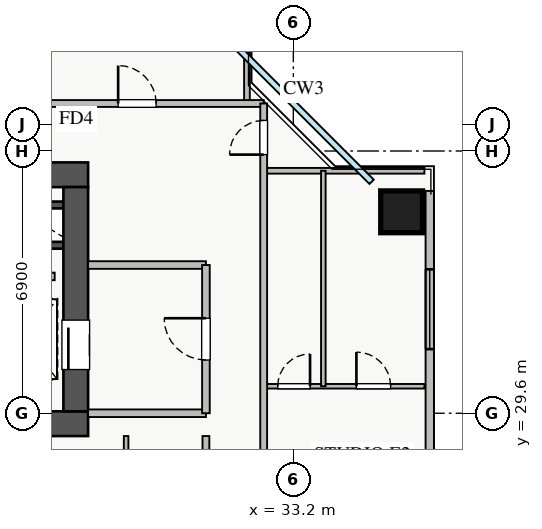
"""IFC4 building model, lengths in metres.
Left out: names, types, materials, properties, quantities, classifications, styles, units other than length and angle.
Written with IfcOpenShell. Run it as: python <this file> out.ifc"""

import sys

from ifc_helpers import new_model, si_unit, direction, frame, frame_2d, origin, origin_2d, place, context, subcontext, project, spatial, rectangle, extrude, source, transform, mapped, element, fill, save


model = new_model("IFC4")
c1 = context("Model", 3, precision=1e-05, world=origin(), true_north=direction((0.0, 1.0)))
c2 = subcontext(c1, "Body", "Model", "MODEL_VIEW")
j1 = project(units=[si_unit("LENGTHUNIT", "METRE"), si_unit("PLANEANGLEUNIT", "RADIAN")], contexts=[c1])
p1 = place(None, origin())
s1 = spatial("IfcSite", under=j1, at=p1, CompositionType="ELEMENT")
p2 = place(p1, origin())
s2 = spatial("IfcBuilding", under=s1, at=p2, CompositionType="ELEMENT")
p3 = place(p2, frame((0.0, 0.0, 113.25)))
s3 = spatial("IfcBuildingStorey", under=s2, at=p3, CompositionType="ELEMENT", Elevation=113.25)
for number, where, z_axis, x_axis in (
    (1, (25.8, 35.08, 0.0), (0.0, 0.0, 1.0), (1.0, 0.0, 0.0)),
    (2, (25.8, 34.02, 0.0), (0.0, 0.0, 1.0), (1.0, 0.0, 0.0)),
):
    element("IfcWall", number, at=place(p3, frame(where, z_axis=z_axis, x_axis=x_axis)), inside=s3, PredefinedType="SHEAR", context=c2, shape_type="SweptSolid", body=[
        extrude(rectangle(XDim=1.35, YDim=0.18, at=frame_2d((0.675, 0.0))), origin(), (0.0, 0.0, 1.0), 3.07),
    ])
p4 = place(p3, frame((10.2, 29.325, 0.0), z_axis=(0.0, 0.0, 1.0), x_axis=(1.0, 0.0, 0.0)))
e3 = element("IfcWall", 3, at=p4, inside=s3, PredefinedType="SHEAR", context=c2, shape_type="SweptSolid", body=[
    extrude(rectangle(XDim=17.6, YDim=0.65, at=frame_2d((8.8, 0.0))), origin(), (0.0, 0.0, 1.0), 3.25),
])
p5 = place(p3, frame((10.2, 35.875, 0.0), z_axis=(0.0, 0.0, 1.0), x_axis=(1.0, 0.0, 0.0)))
e4 = element("IfcWall", 4, at=p5, inside=s3, PredefinedType="SHEAR", context=c2, shape_type="SweptSolid", body=[
    extrude(rectangle(XDim=17.6, YDim=0.65, at=frame_2d((8.8, 0.0))), origin(), (0.0, 0.0, 1.0), 3.25),
])
p6 = place(p5, frame((1.15, 0.0, 0.0)))
e5 = element("IfcOpeningElement", 5, at=p6, cuts=e4, PredefinedType="OPENING", context=c2, shape_type="SweptSolid", body=[
    extrude(rectangle(XDim=1.1, YDim=2.05, at=frame_2d((0.55, 1.025))), frame((0.0, 0.335, 0.0), z_axis=(0.0, -1.0, 0.0), x_axis=(1.0, 0.0, 0.0)), (0.0, 0.0, 1.0), 0.67),
])
p7 = place(p5, frame((8.3, 0.0, 0.0)))
e6 = element("IfcOpeningElement", 6, at=p7, cuts=e4, PredefinedType="OPENING", context=c2, shape_type="SweptSolid", body=[
    extrude(rectangle(XDim=1.1, YDim=2.05, at=frame_2d((0.55, 1.025))), frame((0.0, 0.335, 0.0), z_axis=(0.0, -1.0, 0.0), x_axis=(1.0, 0.0, 0.0)), (0.0, 0.0, 1.0), 0.67),
])
p8 = place(p5, frame((4.9, 0.0, 0.0)))
e7 = element("IfcOpeningElement", 7, at=p8, cuts=e4, PredefinedType="OPENING", context=c2, shape_type="SweptSolid", body=[
    extrude(rectangle(XDim=1.1, YDim=2.05, at=frame_2d((0.55, 1.025))), frame((0.0, 0.335, 0.0), z_axis=(0.0, -1.0, 0.0), x_axis=(1.0, 0.0, 0.0)), (0.0, 0.0, 1.0), 0.67),
])
p9 = place(p5, frame((14.74, 0.0, 0.0)))
e8 = element("IfcOpeningElement", 8, at=p9, cuts=e4, PredefinedType="OPENING", context=c2, shape_type="SweptSolid", body=[
    extrude(rectangle(XDim=1.0, YDim=2.05, at=frame_2d((0.5, 1.025))), frame((0.0, 0.335, 0.0), z_axis=(0.0, -1.0, 0.0), x_axis=(1.0, 0.0, 0.0)), (0.0, 0.0, 1.0), 0.67),
])
p10 = place(p5, frame((10.005, 0.0, 0.0)))
e9 = element("IfcOpeningElement", 9, at=p10, cuts=e4, PredefinedType="OPENING", context=c2, shape_type="SweptSolid", body=[
    extrude(rectangle(XDim=1.0, YDim=2.05, at=frame_2d((0.5, 1.025))), frame((0.0, 0.335, 0.0), z_axis=(0.0, -1.0, 0.0), x_axis=(1.0, 0.0, 0.0)), (0.0, 0.0, 1.0), 0.67),
])
p11 = place(p5, frame((11.55, 0.0, 0.0)))
e10 = element("IfcOpeningElement", 10, at=p11, cuts=e4, PredefinedType="OPENING", context=c2, shape_type="SweptSolid", body=[
    extrude(rectangle(XDim=1.0, YDim=2.05, at=frame_2d((0.5, 1.025))), frame((0.0, 0.335, 0.0), z_axis=(0.0, -1.0, 0.0), x_axis=(1.0, 0.0, 0.0)), (0.0, 0.0, 1.0), 0.67),
])
p12 = place(p5, frame((13.215, 0.0, 0.0)))
e11 = element("IfcOpeningElement", 11, at=p12, cuts=e4, PredefinedType="OPENING", context=c2, shape_type="SweptSolid", body=[
    extrude(rectangle(XDim=1.0, YDim=2.05, at=frame_2d((0.5, 1.025))), frame((0.0, 0.335, 0.0), z_axis=(0.0, -1.0, 0.0), x_axis=(1.0, 0.0, 0.0)), (0.0, 0.0, 1.0), 0.67),
])
p13 = place(p3, frame((27.475, 29.65, 0.0), z_axis=(0.0, 0.0, 1.0), x_axis=(0.0, 1.0, 0.0)))
e12 = element("IfcWall", 12, at=p13, inside=s3, PredefinedType="SHEAR", context=c2, shape_type="SweptSolid", body=[
    extrude(rectangle(XDim=5.9, YDim=0.65, at=frame_2d((2.95, 0.0))), origin(), (0.0, 0.0, 1.0), 3.25),
])
p14 = place(p13, frame((1.1, 0.0, 0.0)))
e13 = element("IfcOpeningElement", 13, at=p14, cuts=e12, PredefinedType="OPENING", context=c2, shape_type="SweptSolid", body=[
    extrude(rectangle(XDim=1.3, YDim=2.05, at=frame_2d((0.65, 1.025))), frame((0.0, 0.335, 0.0), z_axis=(0.0, -1.0, 0.0), x_axis=(1.0, 0.0, 0.0)), (0.0, 0.0, 1.0), 0.67),
])
m1 = source(origin(), c2, "Body", "SweptSolid", [
    extrude(rectangle(XDim=1.1, YDim=1.1, at=origin_2d()), origin(), (0.0, 0.0, 1.0), 3.25),
])
p15 = place(p3, frame((36.05, 34.9, 0.0), z_axis=(0.0, 0.0, 1.0), x_axis=(1.0, 0.0, 0.0)))
e14 = element("IfcColumn", 14, at=p15, inside=s3, PredefinedType="COLUMN", context=c2, shape_type="MappedRepresentation", body=[
    mapped(m1, transform((0.0, 0.0, 0.0), x_axis=(1.0, 0.0, 0.0), y_axis=(0.0, 1.0, 0.0), z_axis=(0.0, 0.0, 1.0), scale=1.0)),
])
p16 = place(p3, frame((36.79, 10.55, 0.0), z_axis=(0.0, 0.0, 1.0), x_axis=(0.0, 1.0, 0.0)))
e15 = element("IfcWall", 15, at=p16, inside=s3, PredefinedType="STANDARD", context=c2, shape_type="SweptSolid", body=[
    extrude(rectangle(XDim=24.9, YDim=0.22, at=frame_2d((12.45, 0.0))), origin(), (0.0, 0.0, 1.0), 2.61),
])
p17 = place(p16, frame((13.3, 0.0, 0.0)))
e16 = element("IfcOpeningElement", 16, at=p17, cuts=e15, PredefinedType="OPENING", context=c2, shape_type="SweptSolid", body=[
    extrude(rectangle(XDim=1.2, YDim=2.1, at=frame_2d((0.6, 1.05))), frame((0.0, 0.12, 0.0), z_axis=(0.0, -1.0, 0.0), x_axis=(1.0, 0.0, 0.0)), (0.0, 0.0, 1.0), 0.24),
])
p18 = place(p16, frame((1.912, 0.0, 0.9)))
e17 = element("IfcOpeningElement", 17, at=p18, cuts=e15, PredefinedType="OPENING", context=c2, shape_type="SweptSolid", body=[
    extrude(rectangle(XDim=2.4, YDim=1.48, at=frame_2d((1.2, 0.74))), frame((0.0, 0.12, 0.0), z_axis=(0.0, -1.0, 0.0), x_axis=(1.0, 0.0, 0.0)), (0.0, 0.0, 1.0), 0.24),
])
p19 = place(p16, frame((20.737, 0.0, 0.9)))
e18 = element("IfcOpeningElement", 18, at=p19, cuts=e15, PredefinedType="OPENING", context=c2, shape_type="SweptSolid", body=[
    extrude(rectangle(XDim=2.1, YDim=1.48, at=frame_2d((1.05, 0.74))), frame((0.0, 0.12, 0.0), z_axis=(0.0, -1.0, 0.0), x_axis=(1.0, 0.0, 0.0)), (0.0, 0.0, 1.0), 0.24),
])
p20 = place(p16, frame((14.72, 0.0, 0.9)))
e19 = element("IfcOpeningElement", 19, at=p20, cuts=e15, PredefinedType="OPENING", context=c2, shape_type="SweptSolid", body=[
    extrude(rectangle(XDim=0.9, YDim=1.2, at=frame_2d((0.45, 0.6))), frame((0.0, 0.12, 0.0), z_axis=(0.0, -1.0, 0.0), x_axis=(1.0, 0.0, 0.0)), (0.0, 0.0, 1.0), 0.24),
])
for number, where, z_axis, x_axis in (
    (20, (27.8, 29.6, 0.0), (0.0, 0.0, 1.0), (1.0, 0.0, 0.0)),
    (21, (27.8, 33.5, 0.0), (0.0, 0.0, 1.0), (1.0, 0.0, 0.0)),
):
    element("IfcWall", number, at=place(p3, frame(where, z_axis=z_axis, x_axis=x_axis)), inside=s3, PredefinedType="PARTITIONING", context=c2, shape_type="SweptSolid", body=[
        extrude(rectangle(XDim=3.1, YDim=0.2, at=frame_2d((1.55, 0.0))), origin(), (0.0, 0.0, 1.0), 3.07),
    ])
p21 = place(p3, frame((30.9, 29.6, 0.0), z_axis=(0.0, 0.0, 1.0), x_axis=(0.0, 1.0, 0.0)))
e22 = element("IfcWall", 22, at=p21, inside=s3, PredefinedType="PARTITIONING", context=c2, shape_type="SweptSolid", body=[
    extrude(rectangle(XDim=3.9, YDim=0.2, at=frame_2d((1.95, 0.0))), origin(), (0.0, 0.0, 1.0), 3.07),
])
p22 = place(p21, frame((1.4, 0.0, 0.0)))
e23 = element("IfcOpeningElement", 23, at=p22, cuts=e22, PredefinedType="OPENING", context=c2, shape_type="SweptSolid", body=[
    extrude(rectangle(XDim=1.1, YDim=2.05, at=frame_2d((0.55, 1.025))), frame((0.0, 0.11, 0.0), z_axis=(0.0, -1.0, 0.0), x_axis=(1.0, 0.0, 0.0)), (0.0, 0.0, 1.0), 0.22),
])
p23 = place(p3, frame((21.75, 33.2, 0.0), z_axis=(0.0, 0.0, 1.0), x_axis=(1.0, 0.0, 0.0)))
e24 = element("IfcWall", 24, at=p23, inside=s3, PredefinedType="PARTITIONING", context=c2, shape_type="SweptSolid", body=[
    extrude(rectangle(XDim=5.17, YDim=0.2, at=frame_2d((2.585, 0.0))), origin(), (0.0, 0.0, 1.0), 3.07),
])
p24 = place(p3, frame((31.98, 37.75, 0.0), z_axis=(0.0, 0.0, 1.0), x_axis=(0.0, 1.0, 0.0)))
e25 = element("IfcWall", 25, at=p24, inside=s3, PredefinedType="PARTITIONING", context=c2, shape_type="SweptSolid", body=[
    extrude(rectangle(XDim=2.9, YDim=0.15, at=frame_2d((1.45, 0.0))), origin(), (0.0, 0.0, 1.0), 3.07),
])
p25 = place(p3, frame((8.85, 37.75, 0.0), z_axis=(0.0, 0.0, 1.0), x_axis=(1.0, 0.0, 0.0)))
e26 = element("IfcWall", 26, at=p25, inside=s3, PredefinedType="PARTITIONING", context=c2, shape_type="SweptSolid", body=[
    extrude(rectangle(XDim=23.57, YDim=0.18, at=frame_2d((11.785, 0.0))), origin(), (0.0, 0.0, 1.0), 3.07),
])
p26 = place(p25, frame((2.035, 0.0, 0.0)))
e27 = element("IfcOpeningElement", 27, at=p26, cuts=e26, PredefinedType="OPENING", context=c2, shape_type="SweptSolid", body=[
    extrude(rectangle(XDim=1.0, YDim=2.05, at=frame_2d((0.5, 1.025))), frame((0.0, 0.1, 0.0), z_axis=(0.0, -1.0, 0.0), x_axis=(1.0, 0.0, 0.0)), (0.0, 0.0, 1.0), 0.2),
])
p27 = place(p25, frame((7.16, 0.0, 0.0)))
e28 = element("IfcOpeningElement", 28, at=p27, cuts=e26, PredefinedType="OPENING", context=c2, shape_type="SweptSolid", body=[
    extrude(rectangle(XDim=1.0, YDim=2.05, at=frame_2d((0.5, 1.025))), frame((0.0, 0.1, 0.0), z_axis=(0.0, -1.0, 0.0), x_axis=(1.0, 0.0, 0.0)), (0.0, 0.0, 1.0), 0.2),
])
p28 = place(p25, frame((13.3, 0.0, 0.0)))
e29 = element("IfcOpeningElement", 29, at=p28, cuts=e26, PredefinedType="OPENING", context=c2, shape_type="SweptSolid", body=[
    extrude(rectangle(XDim=1.0, YDim=2.05, at=frame_2d((0.5, 1.025))), frame((0.0, 0.1, 0.0), z_axis=(0.0, -1.0, 0.0), x_axis=(1.0, 0.0, 0.0)), (0.0, 0.0, 1.0), 0.2),
])
p29 = place(p25, frame((19.74, 0.0, 0.0)))
e30 = element("IfcOpeningElement", 30, at=p29, cuts=e26, PredefinedType="OPENING", context=c2, shape_type="SweptSolid", body=[
    extrude(rectangle(XDim=1.0, YDim=2.05, at=frame_2d((0.5, 1.025))), frame((0.0, 0.1, 0.0), z_axis=(0.0, -1.0, 0.0), x_axis=(1.0, 0.0, 0.0)), (0.0, 0.0, 1.0), 0.2),
])
p30 = place(p3, frame((32.42, 35.98, 0.0), z_axis=(0.0, 0.0, 1.0), x_axis=(1.0, 0.0, 0.0)))
e31 = element("IfcWall", 31, at=p30, inside=s3, PredefinedType="PARTITIONING", context=c2, shape_type="SweptSolid", body=[
    extrude(rectangle(XDim=4.23, YDim=0.15, at=frame_2d((2.115, 0.0))), origin(), (0.0, 0.0, 1.0), 3.07),
])
p31 = place(p3, frame((32.42, 30.31, 0.0), z_axis=(0.0, 0.0, 1.0), x_axis=(1.0, 0.0, 0.0)))
e32 = element("IfcWall", 32, at=p31, inside=s3, PredefinedType="PLUMBINGWALL", context=c2, shape_type="SweptSolid", body=[
    extrude(rectangle(XDim=4.23, YDim=0.12, at=frame_2d((2.115, 0.0))), origin(), (0.0, 0.0, 1.0), 3.07),
])
p32 = place(p31, frame((0.37, 0.0, 0.0)))
e33 = element("IfcOpeningElement", 33, at=p32, cuts=e32, PredefinedType="OPENING", context=c2, shape_type="SweptSolid", body=[
    extrude(rectangle(XDim=0.85, YDim=2.05, at=frame_2d((0.425, 1.025))), frame((0.0, 0.07, 0.0), z_axis=(0.0, -1.0, 0.0), x_axis=(1.0, 0.0, 0.0)), (0.0, 0.0, 1.0), 0.14),
])
p33 = place(p31, frame((2.44, 0.0, 0.0)))
e34 = element("IfcOpeningElement", 34, at=p33, cuts=e32, PredefinedType="OPENING", context=c2, shape_type="SweptSolid", body=[
    extrude(rectangle(XDim=0.9, YDim=2.05, at=frame_2d((0.45, 1.025))), frame((0.0, 0.07, 0.0), z_axis=(0.0, -1.0, 0.0), x_axis=(1.0, 0.0, 0.0)), (0.0, 0.0, 1.0), 0.14),
])
p34 = place(p3, frame((33.99, 30.31, 0.0), z_axis=(0.0, 0.0, 1.0), x_axis=(0.0, 1.0, 0.0)))
e35 = element("IfcWall", 35, at=p34, inside=s3, PredefinedType="PLUMBINGWALL", context=c2, shape_type="SweptSolid", body=[
    extrude(rectangle(XDim=5.67, YDim=0.12, at=frame_2d((2.835, 0.0))), origin(), (0.0, 0.0, 1.0), 3.07),
])
p35 = place(p3, frame((32.42, 8.25, 0.0), z_axis=(0.0, 0.0, 1.0), x_axis=(0.0, 1.0, 0.0)))
e36 = element("IfcWall", 36, at=p35, inside=s3, PredefinedType="PARTITIONING", context=c2, shape_type="SweptSolid", body=[
    extrude(rectangle(XDim=29.5, YDim=0.18, at=frame_2d((14.75, 0.0))), origin(), (0.0, 0.0, 1.0), 3.07),
])
p36 = place(p35, frame((28.155, 0.0, 0.0)))
e37 = element("IfcOpeningElement", 37, at=p36, cuts=e36, PredefinedType="OPENING", context=c2, shape_type="SweptSolid", body=[
    extrude(rectangle(XDim=0.9, YDim=2.05, at=frame_2d((0.45, 1.025))), frame((0.0, 0.1, 0.0), z_axis=(0.0, -1.0, 0.0), x_axis=(1.0, 0.0, 0.0)), (0.0, 0.0, 1.0), 0.2),
])
p37 = place(p35, frame((0.445, 0.0, 0.0)))
e38 = element("IfcOpeningElement", 38, at=p37, cuts=e36, PredefinedType="OPENING", context=c2, shape_type="SweptSolid", body=[
    extrude(rectangle(XDim=0.9, YDim=2.05, at=frame_2d((0.45, 1.025))), frame((0.0, 0.1, 0.0), z_axis=(0.0, -1.0, 0.0), x_axis=(1.0, 0.0, 0.0)), (0.0, 0.0, 1.0), 0.2),
])
p38 = place(p35, frame((4.76, 0.0, 0.0)))
e39 = element("IfcOpeningElement", 39, at=p38, cuts=e36, PredefinedType="OPENING", context=c2, shape_type="SweptSolid", body=[
    extrude(rectangle(XDim=1.0, YDim=2.05, at=frame_2d((0.5, 1.025))), frame((0.0, 0.1, 0.0), z_axis=(0.0, -1.0, 0.0), x_axis=(1.0, 0.0, 0.0)), (0.0, 0.0, 1.0), 0.2),
])
p39 = place(p35, frame((18.04, 0.0, 0.0)))
e40 = element("IfcOpeningElement", 40, at=p39, cuts=e36, PredefinedType="OPENING", context=c2, shape_type="SweptSolid", body=[
    extrude(rectangle(XDim=1.0, YDim=2.05, at=frame_2d((0.5, 1.025))), frame((0.0, 0.1, 0.0), z_axis=(0.0, -1.0, 0.0), x_axis=(1.0, 0.0, 0.0)), (0.0, 0.0, 1.0), 0.2),
])
p40 = place(p3, frame((28.8, 26.11, 0.0), z_axis=(0.0, 0.0, 1.0), x_axis=(0.0, 1.0, 0.0)))
e41 = element("IfcWall", 41, at=p40, inside=s3, PredefinedType="PLUMBINGWALL", context=c2, shape_type="SweptSolid", body=[
    extrude(rectangle(XDim=2.89, YDim=0.12, at=frame_2d((1.445, 0.0))), origin(), (0.0, 0.0, 1.0), 3.07),
])
p41 = place(p3, frame((30.9, 17.0, 0.0), z_axis=(0.0, 0.0, 1.0), x_axis=(0.0, 1.0, 0.0)))
e42 = element("IfcWall", 42, at=p41, inside=s3, PredefinedType="PARTITIONING", context=c2, shape_type="SweptSolid", body=[
    extrude(rectangle(XDim=12.0, YDim=0.18, at=frame_2d((6.0, 0.0))), origin(), (0.0, 0.0, 1.0), 3.07),
])
p42 = place(p41, frame((0.855, 0.0, 0.0)))
e43 = element("IfcOpeningElement", 43, at=p42, cuts=e42, PredefinedType="OPENING", context=c2, shape_type="SweptSolid", body=[
    extrude(rectangle(XDim=1.0, YDim=2.05, at=frame_2d((0.5, 1.025))), frame((0.0, 0.1, 0.0), z_axis=(0.0, -1.0, 0.0), x_axis=(1.0, 0.0, 0.0)), (0.0, 0.0, 1.0), 0.2),
])
p43 = place(p41, frame((6.725, 0.0, 0.0)))
e44 = element("IfcOpeningElement", 44, at=p43, cuts=e42, PredefinedType="OPENING", context=c2, shape_type="SweptSolid", body=[
    extrude(rectangle(XDim=1.0, YDim=2.05, at=frame_2d((0.5, 1.025))), frame((0.0, 0.1, 0.0), z_axis=(0.0, -1.0, 0.0), x_axis=(1.0, 0.0, 0.0)), (0.0, 0.0, 1.0), 0.2),
])
m2 = source(origin(), c2, "Body", "SweptSolid", [
    extrude(rectangle(XDim=2.1, YDim=1.48, at=frame_2d((1.05, 0.74))), frame((0.0, 0.03, 0.0), z_axis=(0.0, -1.0, 0.0), x_axis=(1.0, 0.0, 0.0)), (0.0, 0.0, 1.0), 0.06),
])
p44 = place(p19, origin())
e45 = element("IfcWindow", 45, at=p44, inside=s3, PartitioningType="TRIPLE_PANEL_VERTICAL", PredefinedType="WINDOW", context=c2, shape_type="MappedRepresentation", body=[
    mapped(m2, transform((0.0, 0.0, 0.0), x_axis=(1.0, 0.0, 0.0), y_axis=(0.0, 1.0, 0.0), z_axis=(0.0, 0.0, 1.0), scale=1.0)),
])
fill(e18, e45)
m3 = source(origin(), c2, "Body", "SweptSolid", [
    extrude(rectangle(XDim=1.3, YDim=2.05, at=frame_2d((0.65, 1.025))), frame((0.0, 0.025, 0.0), z_axis=(0.0, -1.0, 0.0), x_axis=(1.0, 0.0, 0.0)), (0.0, 0.0, 1.0), 0.05),
])
p45 = place(p14, origin())
e46 = element("IfcDoor", 46, at=p45, inside=s3, OperationType="SLIDING_TO_LEFT", PredefinedType="DOOR", context=c2, shape_type="MappedRepresentation", body=[
    mapped(m3, transform((0.0, 0.0, 0.0), x_axis=(1.0, 0.0, 0.0), y_axis=(0.0, 1.0, 0.0), z_axis=(0.0, 0.0, 1.0), scale=1.0)),
])
fill(e13, e46)
m4 = source(origin(), c2, "Body", "SweptSolid", [
    extrude(rectangle(XDim=1.1, YDim=2.05, at=frame_2d((0.55, 1.025))), frame((0.0, 0.025, 0.0), z_axis=(0.0, -1.0, 0.0), x_axis=(1.0, 0.0, 0.0)), (0.0, 0.0, 1.0), 0.05),
])
p46 = place(p22, origin())
e47 = element("IfcDoor", 47, at=p46, inside=s3, OperationType="SINGLE_SWING_RIGHT", PredefinedType="DOOR", context=c2, shape_type="MappedRepresentation", body=[
    mapped(m4, transform((0.0, 0.0, 0.0), x_axis=(1.0, 0.0, 0.0), y_axis=(0.0, 1.0, 0.0), z_axis=(0.0, 0.0, 1.0), scale=1.0)),
])
fill(e23, e47)
m5 = source(origin(), c2, "Body", "SweptSolid", [
    extrude(rectangle(XDim=1.0, YDim=2.05, at=frame_2d((0.5, 1.025))), frame((0.0, 0.025, 0.0), z_axis=(0.0, -1.0, 0.0), x_axis=(1.0, 0.0, 0.0)), (0.0, 0.0, 1.0), 0.05),
])
p47 = place(p29, origin())
e48 = element("IfcDoor", 48, at=p47, inside=s3, OperationType="SINGLE_SWING_LEFT", PredefinedType="DOOR", context=c2, shape_type="MappedRepresentation", body=[
    mapped(m5, transform((0.0, 0.0, 0.0), x_axis=(1.0, 0.0, 0.0), y_axis=(0.0, 1.0, 0.0), z_axis=(0.0, 0.0, 1.0), scale=1.0)),
])
fill(e30, e48)
m6 = source(origin(), c2, "Body", "SweptSolid", [
    extrude(rectangle(XDim=0.85, YDim=2.05, at=frame_2d((0.425, 1.025))), frame((0.0, 0.025, 0.0), z_axis=(0.0, -1.0, 0.0), x_axis=(1.0, 0.0, 0.0)), (0.0, 0.0, 1.0), 0.05),
])
p48 = place(p32, origin())
e49 = element("IfcDoor", 49, at=p48, inside=s3, OperationType="SINGLE_SWING_RIGHT", PredefinedType="DOOR", context=c2, shape_type="MappedRepresentation", body=[
    mapped(m6, transform((0.0, 0.0, 0.0), x_axis=(1.0, 0.0, 0.0), y_axis=(0.0, 1.0, 0.0), z_axis=(0.0, 0.0, 1.0), scale=1.0)),
])
fill(e33, e49)
m7 = source(origin(), c2, "Body", "SweptSolid", [
    extrude(rectangle(XDim=0.9, YDim=2.05, at=frame_2d((0.45, 1.025))), frame((0.0, 0.025, 0.0), z_axis=(0.0, -1.0, 0.0), x_axis=(1.0, 0.0, 0.0)), (0.0, 0.0, 1.0), 0.05),
])
p49 = place(p33, origin())
e50 = element("IfcDoor", 50, at=p49, inside=s3, OperationType="SINGLE_SWING_LEFT", PredefinedType="DOOR", context=c2, shape_type="MappedRepresentation", body=[
    mapped(m7, transform((0.0, 0.0, 0.0), x_axis=(1.0, 0.0, 0.0), y_axis=(0.0, 1.0, 0.0), z_axis=(0.0, 0.0, 1.0), scale=1.0)),
])
fill(e34, e50)
p50 = place(p36, origin())
e51 = element("IfcDoor", 51, at=p50, inside=s3, OperationType="SINGLE_SWING_LEFT", PredefinedType="DOOR", context=c2, shape_type="MappedRepresentation", body=[
    mapped(m7, transform((0.0, 0.0, 0.0), x_axis=(1.0, 0.0, 0.0), y_axis=(0.0, 1.0, 0.0), z_axis=(0.0, 0.0, 1.0), scale=1.0)),
])
fill(e37, e51)
save(model, sys.argv[1])
